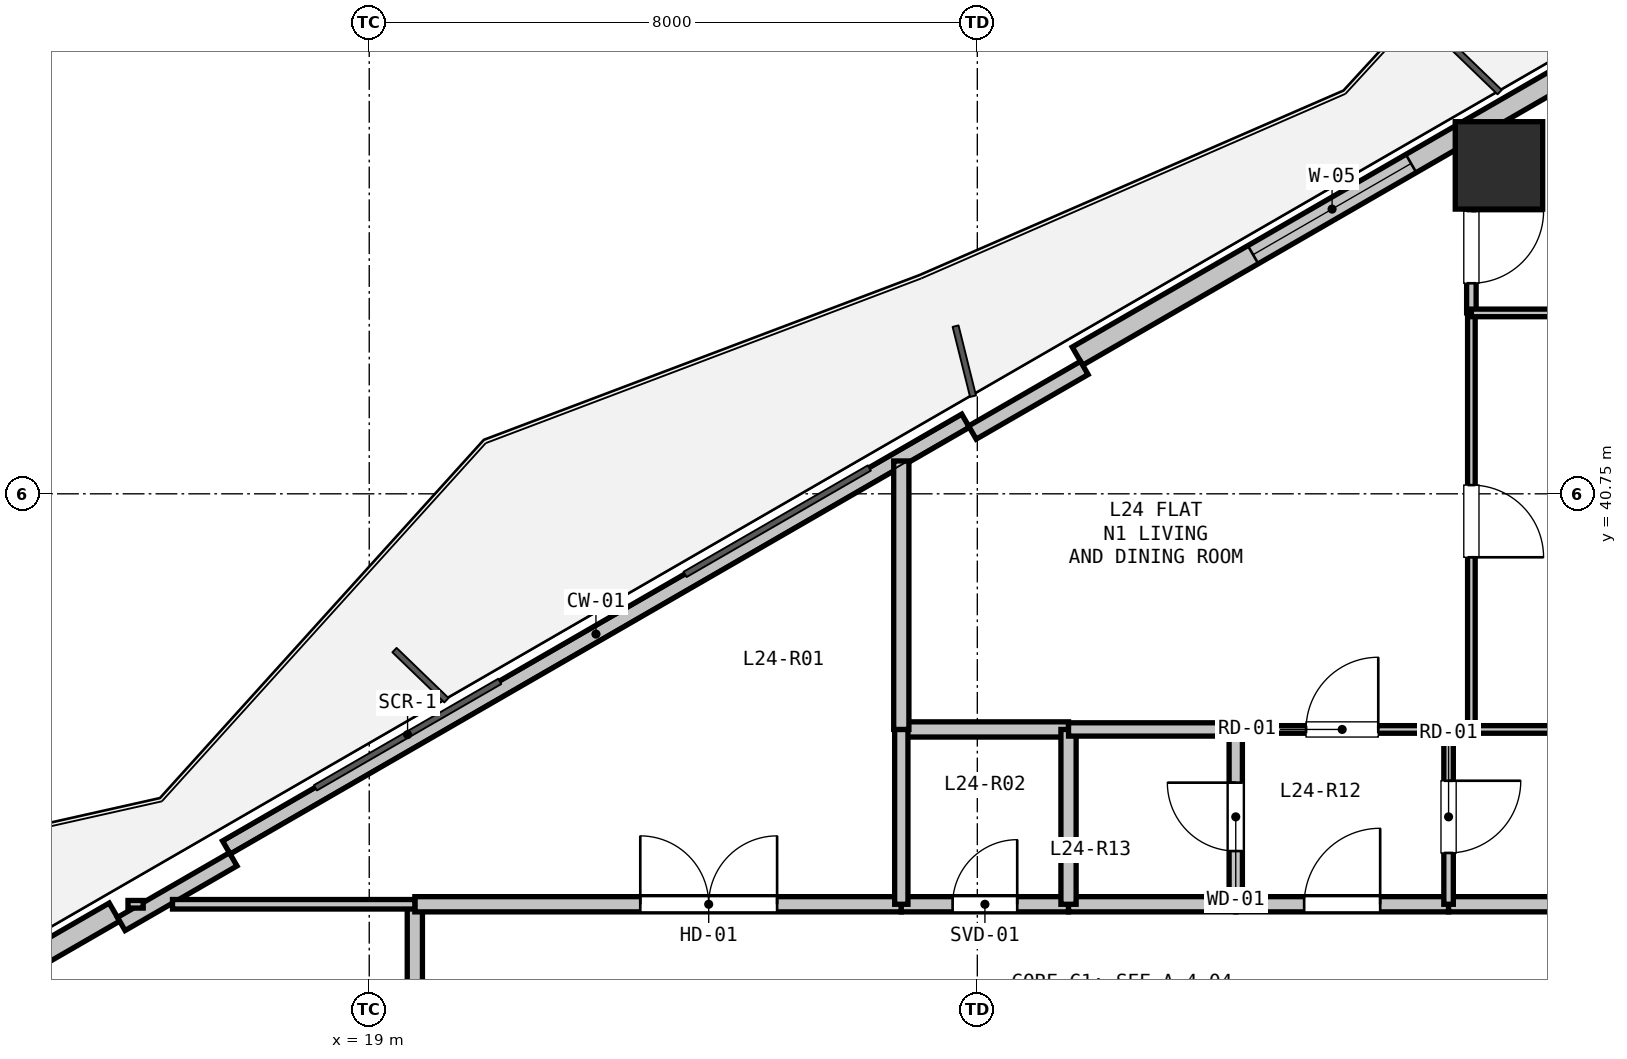
"""IFC4 building model, lengths in metres.
Left out: names, types, materials, properties, quantities, classifications, styles, units other than length and angle.
Written with IfcOpenShell. Run it as: python <this file> out.ifc"""

import sys

from ifc_helpers import new_model, si_unit, direction, frame, frame_2d, origin, origin_2d, place, context, subcontext, project, spatial, rectangle, hollow_rectangle, extrude, element, fill, save


model = new_model("IFC4")
c1 = context("Model", 3, precision=1e-05, world=origin(), true_north=direction((0.0, 1.0)))
c2 = subcontext(c1, "Body", "Model", "MODEL_VIEW")
j1 = project(units=[si_unit("LENGTHUNIT", "METRE"), si_unit("PLANEANGLEUNIT", "RADIAN")], contexts=[c1])
p1 = place(None, origin())
s1 = spatial("IfcSite", under=j1, at=p1, CompositionType="ELEMENT")
p2 = place(p1, origin())
s2 = spatial("IfcBuilding", under=s1, at=p2, CompositionType="ELEMENT")
p3 = place(p2, frame((0.0, 0.0, 90.0)))
s3 = spatial("IfcBuildingStorey", under=s2, at=p3, CompositionType="ELEMENT", Elevation=90.0)
p4 = place(p3, frame((33.863, 45.071, 0.0), z_axis=(0.0, 0.0, 1.0), x_axis=(1.0, 0.0, 0.0)))
e1 = element("IfcColumn", 1, at=p4, inside=s3, PredefinedType="COLUMN", context=c2, shape_type="SweptSolid", body=[
    extrude(hollow_rectangle(XDim=1.15, YDim=1.15, WallThickness=0.032, at=origin_2d()), origin(), (0.0, 0.0, 1.0), 3.3),
])
p5 = place(p3, frame((5.317, 29.282, 0.0), z_axis=(0.0, 0.0, 1.0), x_axis=(0.866023023012, 0.500004123596, 0.0)))
e2 = element("IfcWall", 2, at=p5, inside=s3, PredefinedType="SOLIDWALL", context=c2, shape_type="SweptSolid", body=[
    extrude(rectangle(XDim=11.93, YDim=0.275, at=frame_2d((5.965, 0.0))), origin(), (0.0, 0.0, 1.0), 2.67),
])
p6 = place(p5, frame((8.704, 0.0, 0.0)))
e3 = element("IfcOpeningElement", 3, at=p6, cuts=e2, PredefinedType="OPENING", context=c2, shape_type="SweptSolid", body=[
    extrude(rectangle(XDim=1.0, YDim=2.1, at=frame_2d((0.5, 1.05))), frame((0.0, 0.147, 0.0), z_axis=(0.0, -1.0, 0.0), x_axis=(1.0, 0.0, 0.0)), (0.0, 0.0, 1.0), 0.295),
])
p7 = place(p3, frame((17.12, 36.097, 0.0), z_axis=(0.0, 0.0, 1.0), x_axis=(0.866027010039, 0.499997217876, 0.0)))
e4 = element("IfcWall", 4, at=p7, inside=s3, PredefinedType="PARAPET", context=c2, shape_type="SweptSolid", body=[
    extrude(rectangle(XDim=11.229, YDim=0.2, at=frame_2d((5.615, 0.0))), origin(), (0.0, 0.0, 1.0), 0.2),
])
p8 = place(p3, frame((28.317, 42.562, 0.0), z_axis=(0.0, 0.0, 1.0), x_axis=(0.866023023012, 0.500004123596, 0.0)))
e5 = element("IfcWall", 5, at=p8, inside=s3, PredefinedType="SOLIDWALL", context=c2, shape_type="SweptSolid", body=[
    extrude(rectangle(XDim=11.93, YDim=0.275, at=frame_2d((5.965, 0.0))), origin(), (0.0, 0.0, 1.0), 2.67),
])
p9 = place(p8, frame((2.668, 0.0, 0.9)))
e6 = element("IfcOpeningElement", 6, at=p9, cuts=e5, PredefinedType="OPENING", context=c2, shape_type="SweptSolid", body=[
    extrude(rectangle(XDim=2.4, YDim=1.6, at=frame_2d((1.2, 0.8))), frame((0.0, 0.147, 0.0), z_axis=(0.0, -1.0, 0.0), x_axis=(1.0, 0.0, 0.0)), (0.0, 0.0, 1.0), 0.295),
])
p10 = place(p3, frame((15.738, 35.091, 0.0), z_axis=(0.0, 0.0, 1.0), x_axis=(0.866025371046, 0.500000056704, 0.0)))
e7 = element("IfcWall", 7, at=p10, inside=s3, PredefinedType="PARAPET", context=c2, shape_type="SweptSolid", body=[
    extrude(rectangle(XDim=1.7, YDim=0.2, at=frame_2d((0.85, 0.0))), origin(), (0.0, 0.0, 1.0), 2.67),
])
p11 = place(p3, frame((26.935, 41.556, 0.0), z_axis=(0.0, 0.0, 1.0), x_axis=(0.86605165483, 0.499954529098, 0.0)))
e8 = element("IfcWall", 8, at=p11, inside=s3, PredefinedType="PARAPET", context=c2, shape_type="SweptSolid", body=[
    extrude(rectangle(XDim=1.7, YDim=0.2, at=frame_2d((0.85, 0.0))), origin(), (0.0, 0.0, 1.0), 2.67),
])
p12 = place(p3, frame((19.6, 27.5, 0.0), z_axis=(0.0, 0.0, 1.0), x_axis=(0.0, 1.0, 0.0)))
e9 = element("IfcWall", 9, at=p12, inside=s3, PredefinedType="PARTITIONING", context=c2, shape_type="SweptSolid", body=[
    extrude(rectangle(XDim=7.85, YDim=0.2, at=frame_2d((3.925, 0.0))), origin(), (0.0, 0.0, 1.0), 2.423),
])
p13 = place(p12, frame((3.025, 0.0, 0.0)))
e10 = element("IfcOpeningElement", 10, at=p13, cuts=e9, PredefinedType="OPENING", context=c2, shape_type="SweptSolid", body=[
    extrude(rectangle(XDim=1.8, YDim=2.2, at=frame_2d((0.9, 1.1))), frame((0.0, 0.11, 0.0), z_axis=(0.0, -1.0, 0.0), x_axis=(1.0, 0.0, 0.0)), (0.0, 0.0, 1.0), 0.22),
])
p14 = place(p3, frame((19.6, 35.35, 0.0), z_axis=(0.0, 0.0, 1.0), x_axis=(1.0, 0.0, 0.0)))
e11 = element("IfcWall", 11, at=p14, inside=s3, PredefinedType="PARTITIONING", context=c2, shape_type="SweptSolid", body=[
    extrude(rectangle(XDim=6.4, YDim=0.2, at=frame_2d((3.2, 0.0))), origin(), (0.0, 0.0, 1.0), 3.05),
])
p15 = place(p14, frame((2.966, 0.0, 0.0)))
e12 = element("IfcOpeningElement", 12, at=p15, cuts=e11, PredefinedType="OPENING", context=c2, shape_type="SweptSolid", body=[
    extrude(rectangle(XDim=1.8, YDim=2.2, at=frame_2d((0.9, 1.1))), frame((0.0, 0.11, 0.0), z_axis=(0.0, -1.0, 0.0), x_axis=(1.0, 0.0, 0.0)), (0.0, 0.0, 1.0), 0.22),
])
p16 = place(p3, frame((26.0, 35.35, 0.0), z_axis=(0.0, 0.0, 1.0), x_axis=(1.0, 0.0, 0.0)))
e13 = element("IfcWall", 13, at=p16, inside=s3, PredefinedType="PARTITIONING", context=c2, shape_type="SweptSolid", body=[
    extrude(rectangle(XDim=2.2, YDim=0.2, at=frame_2d((1.1, 0.0))), origin(), (0.0, 0.0, 1.0), 3.05),
])
p17 = place(p16, frame((0.675, 0.0, 0.0)))
e14 = element("IfcOpeningElement", 14, at=p17, cuts=e13, PredefinedType="OPENING", context=c2, shape_type="SweptSolid", body=[
    extrude(rectangle(XDim=0.85, YDim=2.1, at=frame_2d((0.425, 1.05))), frame((0.0, 0.11, 0.0), z_axis=(0.0, -1.0, 0.0), x_axis=(1.0, 0.0, 0.0)), (0.0, 0.0, 1.0), 0.22),
])
p18 = place(p3, frame((28.2, 35.35, 0.0), z_axis=(0.0, 0.0, 1.0), x_axis=(1.0, 0.0, 0.0)))
e15 = element("IfcWall", 15, at=p18, inside=s3, PredefinedType="PARTITIONING", context=c2, shape_type="SweptSolid", body=[
    extrude(rectangle(XDim=2.2, YDim=0.2, at=frame_2d((1.1, 0.0))), origin(), (0.0, 0.0, 1.0), 3.05),
])
p19 = place(p3, frame((30.4, 35.35, 0.0), z_axis=(0.0, 0.0, 1.0), x_axis=(1.0, 0.0, 0.0)))
e16 = element("IfcWall", 16, at=p19, inside=s3, PredefinedType="PARTITIONING", context=c2, shape_type="SweptSolid", body=[
    extrude(rectangle(XDim=2.8, YDim=0.2, at=frame_2d((1.4, 0.0))), origin(), (0.0, 0.0, 1.0), 3.05),
])
p20 = place(p19, frame((0.9, 0.0, 0.0)))
e17 = element("IfcOpeningElement", 17, at=p20, cuts=e16, PredefinedType="OPENING", context=c2, shape_type="SweptSolid", body=[
    extrude(rectangle(XDim=1.0, YDim=2.15, at=frame_2d((0.5, 1.075))), frame((0.0, 0.11, 0.0), z_axis=(0.0, -1.0, 0.0), x_axis=(1.0, 0.0, 0.0)), (0.0, 0.0, 1.0), 0.22),
])
p21 = place(p3, frame((33.2, 35.35, 0.0), z_axis=(0.0, 0.0, 1.0), x_axis=(1.0, 0.0, 0.0)))
e18 = element("IfcWall", 18, at=p21, inside=s3, PredefinedType="PARTITIONING", context=c2, shape_type="SweptSolid", body=[
    extrude(rectangle(XDim=2.6, YDim=0.2, at=frame_2d((1.3, 0.0))), origin(), (0.0, 0.0, 1.0), 3.05),
])
p22 = place(p3, frame((30.4, 37.65, 0.0), z_axis=(0.0, 0.0, 1.0), x_axis=(1.0, 0.0, 0.0)))
e19 = element("IfcWall", 19, at=p22, inside=s3, PredefinedType="PARTITIONING", context=c2, shape_type="SweptSolid", body=[
    extrude(rectangle(XDim=2.8, YDim=0.1, at=frame_2d((1.4, 0.0))), origin(), (0.0, 0.0, 1.0), 3.05),
])
p23 = place(p22, frame((0.925, 0.0, 0.0)))
e20 = element("IfcOpeningElement", 20, at=p23, cuts=e19, PredefinedType="OPENING", context=c2, shape_type="SweptSolid", body=[
    extrude(rectangle(XDim=0.95, YDim=2.1, at=frame_2d((0.475, 1.05))), frame((0.0, 0.06, 0.0), z_axis=(0.0, -1.0, 0.0), x_axis=(1.0, 0.0, 0.0)), (0.0, 0.0, 1.0), 0.12),
])
p24 = place(p3, frame((33.2, 37.65, 0.0), z_axis=(0.0, 0.0, 1.0), x_axis=(0.0, -1.0, 0.0)))
e21 = element("IfcWall", 21, at=p24, inside=s3, PredefinedType="PARTITIONING", context=c2, shape_type="SweptSolid", body=[
    extrude(rectangle(XDim=2.3, YDim=0.125, at=frame_2d((1.15, 0.0))), origin(), (0.0, 0.0, 1.0), 3.05),
])
p25 = place(p24, frame((0.675, 0.0, 0.0)))
e22 = element("IfcOpeningElement", 22, at=p25, cuts=e21, PredefinedType="OPENING", context=c2, shape_type="SweptSolid", body=[
    extrude(rectangle(XDim=0.95, YDim=2.1, at=frame_2d((0.475, 1.05))), frame((0.0, 0.073, 0.0), z_axis=(0.0, -1.0, 0.0), x_axis=(1.0, 0.0, 0.0)), (0.0, 0.0, 1.0), 0.145),
])
p26 = place(p3, frame((30.4, 35.35, 0.0), z_axis=(0.0, 0.0, 1.0), x_axis=(0.0, 1.0, 0.0)))
e23 = element("IfcWall", 23, at=p26, inside=s3, PredefinedType="PLUMBINGWALL", context=c2, shape_type="SweptSolid", body=[
    extrude(rectangle(XDim=2.3, YDim=0.175, at=frame_2d((1.15, 0.0))), origin(), (0.0, 0.0, 1.0), 3.05),
])
p27 = place(p26, frame((0.7, 0.0, 0.0)))
e24 = element("IfcOpeningElement", 24, at=p27, cuts=e23, PredefinedType="OPENING", context=c2, shape_type="SweptSolid", body=[
    extrude(rectangle(XDim=0.9, YDim=2.1, at=frame_2d((0.45, 1.05))), frame((0.0, 0.097, 0.0), z_axis=(0.0, -1.0, 0.0), x_axis=(1.0, 0.0, 0.0)), (0.0, 0.0, 1.0), 0.195),
])
p28 = place(p3, frame((26.0, 37.65, 0.0), z_axis=(0.0, 0.0, 1.0), x_axis=(1.0, 0.0, 0.0)))
e25 = element("IfcWall", 25, at=p28, inside=s3, PredefinedType="PARTITIONING", context=c2, shape_type="SweptSolid", body=[
    extrude(rectangle(XDim=2.2, YDim=0.2, at=frame_2d((1.1, 0.0))), origin(), (0.0, 0.0, 1.0), 3.05),
])
p29 = place(p3, frame((28.2, 37.65, 0.0), z_axis=(0.0, 0.0, 1.0), x_axis=(0.0, -1.0, 0.0)))
e26 = element("IfcWall", 26, at=p29, inside=s3, PredefinedType="PARTITIONING", context=c2, shape_type="SweptSolid", body=[
    extrude(rectangle(XDim=2.3, YDim=0.2, at=frame_2d((1.15, 0.0))), origin(), (0.0, 0.0, 1.0), 3.05),
])
p30 = place(p3, frame((26.0, 35.35, 0.0), z_axis=(0.0, 0.0, 1.0), x_axis=(0.0, 1.0, 0.0)))
e27 = element("IfcWall", 27, at=p30, inside=s3, PredefinedType="PLUMBINGWALL", context=c2, shape_type="SweptSolid", body=[
    extrude(rectangle(XDim=2.3, YDim=0.175, at=frame_2d((1.15, 0.0))), origin(), (0.0, 0.0, 1.0), 3.05),
])
p31 = place(p3, frame((28.2, 37.65, 0.0), z_axis=(0.0, 0.0, 1.0), x_axis=(1.0, 0.0, 0.0)))
e28 = element("IfcWall", 28, at=p31, inside=s3, PredefinedType="PLUMBINGWALL", context=c2, shape_type="SweptSolid", body=[
    extrude(rectangle(XDim=2.2, YDim=0.175, at=frame_2d((1.1, 0.0))), origin(), (0.0, 0.0, 1.0), 3.05),
])
p32 = place(p3, frame((33.2, 37.65, 0.0), z_axis=(0.0, 0.0, 1.0), x_axis=(1.0, 0.0, 0.0)))
e29 = element("IfcWall", 29, at=p32, inside=s3, PredefinedType="PARTITIONING", context=c2, shape_type="SweptSolid", body=[
    extrude(rectangle(XDim=0.3, YDim=0.125, at=frame_2d((0.15, 0.0))), origin(), (0.0, 0.0, 1.0), 3.05),
])
p33 = place(p3, frame((33.5, 37.65, 0.0), z_axis=(0.0, 0.0, 1.0), x_axis=(1.0, 0.0, 0.0)))
e30 = element("IfcWall", 30, at=p33, inside=s3, PredefinedType="PARTITIONING", context=c2, shape_type="SweptSolid", body=[
    extrude(rectangle(XDim=4.77, YDim=0.1, at=frame_2d((2.385, 0.0))), origin(), (0.0, 0.0, 1.0), 2.423),
])
p34 = place(p3, frame((26.0, 41.182, 0.0), z_axis=(0.0, 0.0, 1.0), x_axis=(0.0, -1.0, 0.0)))
e31 = element("IfcWall", 31, at=p34, inside=s3, PredefinedType="PARTITIONING", context=c2, shape_type="SweptSolid", body=[
    extrude(rectangle(XDim=3.532, YDim=0.2, at=frame_2d((1.766, 0.0))), origin(), (0.0, 0.0, 1.0), 2.365),
])
p35 = place(p3, frame((19.6, 35.35, 0.0), z_axis=(0.0, 0.0, 1.0), x_axis=(-1.0, 0.0, 0.0)))
e32 = element("IfcWall", 32, at=p35, inside=s3, PredefinedType="PARTITIONING", context=c2, shape_type="SweptSolid", body=[
    extrude(rectangle(XDim=3.188, YDim=0.125, at=frame_2d((1.594, 0.0))), origin(), (0.0, 0.0, 1.0), 2.365),
])
p36 = place(p3, frame((16.026, 35.35, 0.0), z_axis=(0.0, 0.0, 1.0), x_axis=(-1.0, 0.0, 0.0)))
e33 = element("IfcWall", 33, at=p36, inside=s3, PredefinedType="PARTITIONING", context=c2, shape_type="SweptSolid", body=[
    extrude(rectangle(XDim=0.2, YDim=0.1, at=frame_2d((0.1, 0.0))), origin(), (0.0, 0.0, 1.0), 3.05),
])
p37 = place(p3, frame((33.5, 45.367, 0.0), z_axis=(0.0, 0.0, 1.0), x_axis=(0.0, -1.0, 0.0)))
e34 = element("IfcWall", 34, at=p37, inside=s3, PredefinedType="PARTITIONING", context=c2, shape_type="SweptSolid", body=[
    extrude(rectangle(XDim=2.237, YDim=0.125, at=frame_2d((1.119, 0.0))), origin(), (0.0, 0.0, 1.0), 2.66),
])
p38 = place(p37, frame((0.897, 0.0, 0.0)))
e35 = element("IfcOpeningElement", 35, at=p38, cuts=e34, PredefinedType="OPENING", context=c2, shape_type="SweptSolid", body=[
    extrude(rectangle(XDim=0.95, YDim=2.1, at=frame_2d((0.475, 1.05))), frame((0.0, 0.073, 0.0), z_axis=(0.0, -1.0, 0.0), x_axis=(1.0, 0.0, 0.0)), (0.0, 0.0, 1.0), 0.145),
])
p39 = place(p3, frame((33.5, 43.13, 0.0), z_axis=(0.0, 0.0, 1.0), x_axis=(0.0, -1.0, 0.0)))
e36 = element("IfcWall", 36, at=p39, inside=s3, PredefinedType="PARTITIONING", context=c2, shape_type="SweptSolid", body=[
    extrude(rectangle(XDim=5.48, YDim=0.1, at=frame_2d((2.74, 0.0))), origin(), (0.0, 0.0, 1.0), 3.05),
])
p40 = place(p39, frame((2.265, 0.0, 0.0)))
e37 = element("IfcOpeningElement", 37, at=p40, cuts=e36, PredefinedType="OPENING", context=c2, shape_type="SweptSolid", body=[
    extrude(rectangle(XDim=0.95, YDim=2.1, at=frame_2d((0.475, 1.05))), frame((0.0, 0.06, 0.0), z_axis=(0.0, -1.0, 0.0), x_axis=(1.0, 0.0, 0.0)), (0.0, 0.0, 1.0), 0.12),
])
p41 = place(p3, frame((33.5, 43.13, 0.0), z_axis=(0.0, 0.0, 1.0), x_axis=(1.0, 0.0, 0.0)))
e38 = element("IfcWall", 38, at=p41, inside=s3, PredefinedType="PARTITIONING", context=c2, shape_type="SweptSolid", body=[
    extrude(rectangle(XDim=4.77, YDim=0.1, at=frame_2d((2.385, 0.0))), origin(), (0.0, 0.0, 1.0), 2.423),
])
p42 = place(p41, frame((1.91, 0.0, 0.0)))
e39 = element("IfcOpeningElement", 39, at=p42, cuts=e38, PredefinedType="OPENING", context=c2, shape_type="SweptSolid", body=[
    extrude(rectangle(XDim=0.95, YDim=2.1, at=frame_2d((0.475, 1.05))), frame((0.0, 0.06, 0.0), z_axis=(0.0, -1.0, 0.0), x_axis=(1.0, 0.0, 0.0)), (0.0, 0.0, 1.0), 0.12),
])
p43 = place(p9, origin())
e40 = element("IfcWindow", 40, at=p43, inside=s3, PartitioningType="SINGLE_PANEL", PredefinedType="WINDOW", context=c2, shape_type="SweptSolid", body=[
    extrude(rectangle(XDim=2.4, YDim=1.6, at=frame_2d((1.2, 0.8))), frame((0.0, 0.03, 0.0), z_axis=(0.0, -1.0, 0.0), x_axis=(1.0, 0.0, 0.0)), (0.0, 0.0, 1.0), 0.06),
])
fill(e6, e40)
p44 = place(p20, origin())
e41 = element("IfcDoor", 41, at=p44, inside=s3, OperationType="SINGLE_SWING_RIGHT", PredefinedType="DOOR", context=c2, shape_type="SweptSolid", body=[
    extrude(rectangle(XDim=1.0, YDim=2.15, at=frame_2d((0.5, 1.075))), frame((0.0, 0.025, 0.0), z_axis=(0.0, -1.0, 0.0), x_axis=(1.0, 0.0, 0.0)), (0.0, 0.0, 1.0), 0.05),
])
fill(e17, e41)
p45 = place(p17, origin())
e42 = element("IfcDoor", 42, at=p45, inside=s3, OperationType="SINGLE_SWING_RIGHT", PredefinedType="DOOR", context=c2, shape_type="SweptSolid", body=[
    extrude(rectangle(XDim=0.85, YDim=2.1, at=frame_2d((0.425, 1.05))), frame((0.0, 0.025, 0.0), z_axis=(0.0, -1.0, 0.0), x_axis=(1.0, 0.0, 0.0)), (0.0, 0.0, 1.0), 0.05),
])
fill(e14, e42)
p46 = place(p15, origin())
e43 = element("IfcDoor", 43, at=p46, inside=s3, OperationType="DOUBLE_DOOR_SINGLE_SWING", PredefinedType="DOOR", context=c2, shape_type="SweptSolid", body=[
    extrude(rectangle(XDim=1.8, YDim=2.2, at=frame_2d((0.9, 1.1))), frame((0.0, 0.025, 0.0), z_axis=(0.0, -1.0, 0.0), x_axis=(1.0, 0.0, 0.0)), (0.0, 0.0, 1.0), 0.05),
])
fill(e12, e43)
p47 = place(p27, origin())
e44 = element("IfcDoor", 44, at=p47, inside=s3, OperationType="SINGLE_SWING_RIGHT", PredefinedType="DOOR", context=c2, shape_type="SweptSolid", body=[
    extrude(rectangle(XDim=0.9, YDim=2.1, at=frame_2d((0.45, 1.05))), frame((0.0, 0.025, 0.0), z_axis=(0.0, -1.0, 0.0), x_axis=(1.0, 0.0, 0.0)), (0.0, 0.0, 1.0), 0.05),
])
fill(e24, e44)
p48 = place(p25, origin())
e45 = element("IfcDoor", 45, at=p48, inside=s3, OperationType="SINGLE_SWING_LEFT", PredefinedType="DOOR", context=c2, shape_type="SweptSolid", body=[
    extrude(rectangle(XDim=0.95, YDim=2.1, at=frame_2d((0.475, 1.05))), frame((0.0, 0.025, 0.0), z_axis=(0.0, -1.0, 0.0), x_axis=(1.0, 0.0, 0.0)), (0.0, 0.0, 1.0), 0.05),
])
fill(e22, e45)
p49 = place(p23, origin())
e46 = element("IfcDoor", 46, at=p49, inside=s3, OperationType="SINGLE_SWING_RIGHT", PredefinedType="DOOR", context=c2, shape_type="SweptSolid", body=[
    extrude(rectangle(XDim=0.95, YDim=2.1, at=frame_2d((0.475, 1.05))), frame((0.0, 0.025, 0.0), z_axis=(0.0, -1.0, 0.0), x_axis=(1.0, 0.0, 0.0)), (0.0, 0.0, 1.0), 0.05),
])
fill(e20, e46)
p50 = place(p40, origin())
e47 = element("IfcDoor", 47, at=p50, inside=s3, OperationType="SINGLE_SWING_RIGHT", PredefinedType="DOOR", context=c2, shape_type="SweptSolid", body=[
    extrude(rectangle(XDim=0.95, YDim=2.1, at=frame_2d((0.475, 1.05))), frame((0.0, 0.025, 0.0), z_axis=(0.0, -1.0, 0.0), x_axis=(1.0, 0.0, 0.0)), (0.0, 0.0, 1.0), 0.05),
])
fill(e37, e47)
p51 = place(p38, origin())
e48 = element("IfcDoor", 48, at=p51, inside=s3, OperationType="SINGLE_SWING_LEFT", PredefinedType="DOOR", context=c2, shape_type="SweptSolid", body=[
    extrude(rectangle(XDim=0.95, YDim=2.1, at=frame_2d((0.475, 1.05))), frame((0.0, 0.025, 0.0), z_axis=(0.0, -1.0, 0.0), x_axis=(1.0, 0.0, 0.0)), (0.0, 0.0, 1.0), 0.05),
])
fill(e35, e48)
save(model, sys.argv[1])
